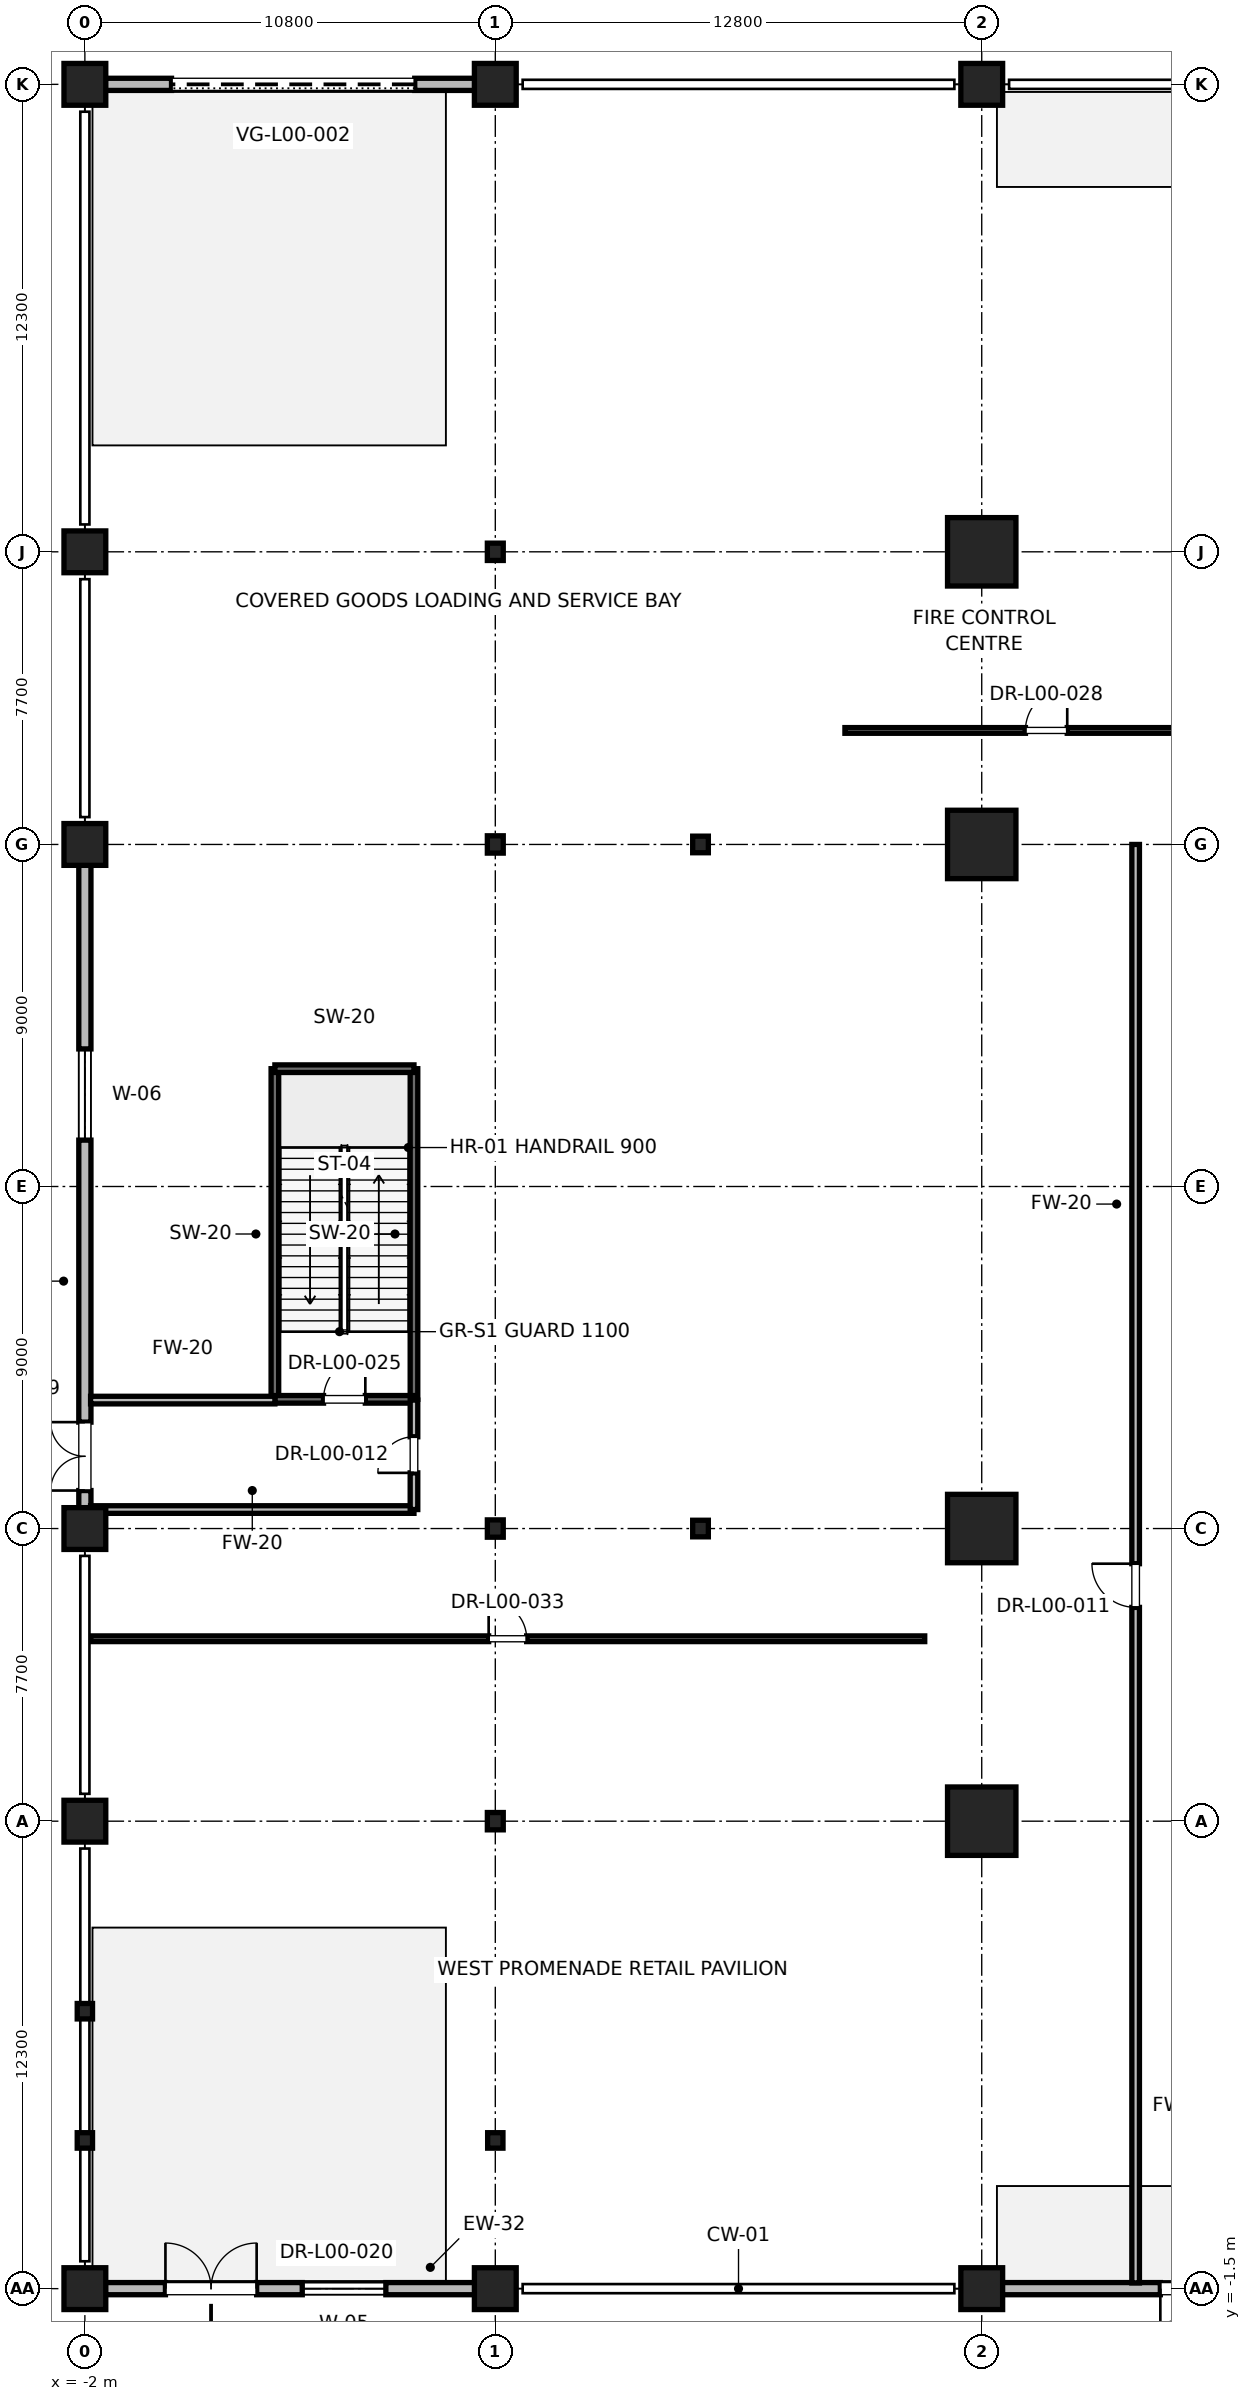
"""IFC4 building model, lengths in metres.
Left out: names, types, materials, properties, quantities, classifications, styles, units other than length and angle.
Written with IfcOpenShell. Run it as: python <this file> out.ifc"""

import sys

from ifc_helpers import new_model, si_unit, direction, frame, frame_2d, origin, origin_2d, place, context, subcontext, project, spatial, rectangle, i_section, extrude, element, fill, save


model = new_model("IFC4")
c1 = context("Model", 3, precision=1e-05, world=origin(), true_north=direction((0.0, 1.0)))
c2 = subcontext(c1, "Body", "Model", "MODEL_VIEW")
j1 = project(units=[si_unit("LENGTHUNIT", "METRE"), si_unit("PLANEANGLEUNIT", "RADIAN")], contexts=[c1])
p1 = place(None, origin())
s1 = spatial("IfcSite", under=j1, at=p1, CompositionType="ELEMENT")
p2 = place(p1, origin())
s2 = spatial("IfcBuilding", under=s1, at=p2, CompositionType="ELEMENT")
p3 = place(p2, origin())
s3 = spatial("IfcBuildingStorey", under=s2, at=p3, CompositionType="ELEMENT", Elevation=0.0)
for number, where, z_axis, x_axis in (
    (1, (21.6, 18.5, 0.0), (0.0, 0.0, 1.0), (1.0, 0.0, 0.0)),
    (2, (21.6, 36.5, 0.0), (0.0, 0.0, 1.0), (1.0, 0.0, 0.0)),
    (3, (21.6, 10.8, 0.0), (0.0, 0.0, 1.0), (1.0, 0.0, 0.0)),
    (4, (21.6, 44.2, 0.0), (0.0, 0.0, 1.0), (1.0, 0.0, 0.0)),
):
    element("IfcColumn", number, at=place(p3, frame(where, z_axis=z_axis, x_axis=x_axis)), inside=s3, PredefinedType="COLUMN", context=c2, shape_type="SweptSolid", body=[
        extrude(rectangle(XDim=1.8, YDim=1.8, at=origin_2d()), origin(), (0.0, 0.0, 1.0), 6.0),
    ])
for number, where, z_axis, x_axis in (
    (5, (14.2, 18.5, 0.0), (0.0, 0.0, 1.0), (1.0, 0.0, 0.0)),
    (6, (14.2, 36.5, 0.0), (0.0, 0.0, 1.0), (1.0, 0.0, 0.0)),
):
    element("IfcColumn", number, at=place(p3, frame(where, z_axis=z_axis, x_axis=x_axis)), inside=s3, PredefinedType="COLUMN", context=c2, shape_type="SweptSolid", body=[
        extrude(i_section(OverallWidth=0.412, OverallDepth=0.437, WebThickness=0.036, FlangeThickness=0.058, FilletRadius=0.015, at=origin_2d()), origin(), (0.0, 0.0, 1.0), 6.0),
    ])
for number, where, z_axis, x_axis in (
    (7, (-2.0, -1.5, 0.0), (0.0, 0.0, 1.0), (1.0, 0.0, 0.0)),
    (8, (-2.0, 10.8, 0.0), (0.0, 0.0, 1.0), (1.0, 0.0, 0.0)),
    (9, (-2.0, 18.5, 0.0), (0.0, 0.0, 1.0), (1.0, 0.0, 0.0)),
    (10, (-2.0, 36.5, 0.0), (0.0, 0.0, 1.0), (1.0, 0.0, 0.0)),
    (11, (-2.0, 44.2, 0.0), (0.0, 0.0, 1.0), (1.0, 0.0, 0.0)),
    (12, (-2.0, 56.5, 0.0), (0.0, 0.0, 1.0), (1.0, 0.0, 0.0)),
    (13, (8.8, -1.5, 0.0), (0.0, 0.0, 1.0), (1.0, 0.0, 0.0)),
    (14, (21.6, -1.5, 0.0), (0.0, 0.0, 1.0), (1.0, 0.0, 0.0)),
    (15, (8.8, 56.5, 0.0), (0.0, 0.0, 1.0), (1.0, 0.0, 0.0)),
    (16, (21.6, 56.5, 0.0), (0.0, 0.0, 1.0), (1.0, 0.0, 0.0)),
):
    element("IfcColumn", number, at=place(p3, frame(where, z_axis=z_axis, x_axis=x_axis)), inside=s3, PredefinedType="COLUMN", context=c2, shape_type="SweptSolid", body=[
        extrude(rectangle(XDim=1.1, YDim=1.1, at=origin_2d()), origin(), (0.0, 0.0, 1.0), 6.0),
    ])
for number, where, z_axis, x_axis in (
    (17, (8.8, 10.8, 0.0), (0.0, 0.0, 1.0), (1.0, 0.0, 0.0)),
    (18, (8.8, 18.5, 0.0), (0.0, 0.0, 1.0), (1.0, 0.0, 0.0)),
    (19, (8.8, 36.5, 0.0), (0.0, 0.0, 1.0), (1.0, 0.0, 0.0)),
    (20, (8.8, 44.2, 0.0), (0.0, 0.0, 1.0), (1.0, 0.0, 0.0)),
):
    element("IfcColumn", number, at=place(p3, frame(where, z_axis=z_axis, x_axis=x_axis)), inside=s3, PredefinedType="COLUMN", context=c2, shape_type="SweptSolid", body=[
        extrude(i_section(OverallWidth=0.418, OverallDepth=0.456, WebThickness=0.042, FlangeThickness=0.067, FilletRadius=0.015, at=origin_2d()), origin(), (0.0, 0.0, 1.0), 6.0),
    ])
for number, where, z_axis, x_axis in (
    (21, (-2.0, 2.4, 0.0), (0.0, 0.0, 1.0), (1.0, 0.0, 0.0)),
    (22, (8.8, 2.4, 0.0), (0.0, 0.0, 1.0), (1.0, 0.0, 0.0)),
    (23, (-2.0, 5.8, 0.0), (0.0, 0.0, 1.0), (1.0, 0.0, 0.0)),
):
    element("IfcColumn", number, at=place(p3, frame(where, z_axis=z_axis, x_axis=x_axis)), inside=s3, PredefinedType="COLUMN", context=c2, shape_type="SweptSolid", body=[
        extrude(i_section(OverallWidth=0.403, OverallDepth=0.406, WebThickness=0.027, FlangeThickness=0.043, FilletRadius=0.015, at=origin_2d()), origin(), (0.0, 0.0, 1.0), 6.0),
    ])
p4 = place(p3, frame((-1.46, -1.5, 0.0), z_axis=(0.0, 0.0, 1.0), x_axis=(1.0, 0.0, 0.0)))
e24 = element("IfcWall", 24, at=p4, inside=s3, PredefinedType="SOLIDWALL", context=c2, shape_type="SweptSolid", body=[
    extrude(rectangle(XDim=9.72, YDim=0.32, at=frame_2d((4.86, 0.0))), origin(), (0.0, 0.0, 1.0), 4.759),
])
p5 = place(p4, frame((1.58, 0.0, 0.0)))
e25 = element("IfcOpeningElement", 25, at=p5, cuts=e24, PredefinedType="OPENING", context=c2, shape_type="SweptSolid", body=[
    extrude(rectangle(XDim=2.4, YDim=2.8, at=frame_2d((1.2, 1.4))), frame((0.0, 0.16, 0.0), z_axis=(0.0, -1.0, 0.0), x_axis=(1.0, 0.0, 0.0)), (0.0, 0.0, 1.0), 0.32),
])
p6 = place(p4, frame((5.18, 0.0, 0.85)))
e26 = element("IfcOpeningElement", 26, at=p6, cuts=e24, PredefinedType="OPENING", context=c2, shape_type="SweptSolid", body=[
    extrude(rectangle(XDim=2.2, YDim=2.35, at=frame_2d((1.1, 1.175))), frame((0.0, 0.16, 0.0), z_axis=(0.0, -1.0, 0.0), x_axis=(1.0, 0.0, 0.0)), (0.0, 0.0, 1.0), 0.32),
])
p7 = place(p3, frame((28.46, -1.5, 0.0), z_axis=(0.0, 0.0, 1.0), x_axis=(-1.0, 0.0, 0.0)))
e27 = element("IfcWall", 27, at=p7, inside=s3, PredefinedType="SOLIDWALL", context=c2, shape_type="SweptSolid", body=[
    extrude(rectangle(XDim=6.32, YDim=0.32, at=frame_2d((3.16, 0.0))), origin(), (0.0, 0.0, 1.0), 4.33),
])
p8 = place(p7, frame((0.36, 0.0, 0.0)))
e28 = element("IfcOpeningElement", 28, at=p8, cuts=e27, PredefinedType="OPENING", context=c2, shape_type="SweptSolid", body=[
    extrude(rectangle(XDim=1.8, YDim=2.4, at=frame_2d((0.9, 1.2))), frame((0.0, 0.16, 0.0), z_axis=(0.0, -1.0, 0.0), x_axis=(1.0, 0.0, 0.0)), (0.0, 0.0, 1.0), 0.32),
])
p9 = place(p3, frame((8.26, 56.5, 0.0), z_axis=(0.0, 0.0, 1.0), x_axis=(-1.0, 0.0, 0.0)))
e29 = element("IfcWall", 29, at=p9, inside=s3, PredefinedType="SOLIDWALL", context=c2, shape_type="SweptSolid", body=[
    extrude(rectangle(XDim=9.72, YDim=0.32, at=frame_2d((4.86, 0.0))), origin(), (0.0, 0.0, 1.0), 4.759),
])
p10 = place(p9, frame((1.58, 0.0, 0.0)))
e30 = element("IfcOpeningElement", 30, at=p10, cuts=e29, PredefinedType="OPENING", context=c2, shape_type="SweptSolid", body=[
    extrude(rectangle(XDim=6.4, YDim=4.1, at=frame_2d((3.2, 2.05))), frame((0.0, 0.16, 0.0), z_axis=(0.0, -1.0, 0.0), x_axis=(1.0, 0.0, 0.0)), (0.0, 0.0, 1.0), 0.32),
])
p11 = place(p3, frame((-2.0, 19.04, 0.0), z_axis=(0.0, 0.0, 1.0), x_axis=(0.0, 1.0, 0.0)))
e31 = element("IfcWall", 31, at=p11, inside=s3, PredefinedType="SOLIDWALL", context=c2, shape_type="SweptSolid", body=[
    extrude(rectangle(XDim=16.92, YDim=0.32, at=frame_2d((8.46, 0.0))), origin(), (0.0, 0.0, 1.0), 4.759),
])
p12 = place(p11, frame((0.46, 0.0, 0.0)))
e32 = element("IfcOpeningElement", 32, at=p12, cuts=e31, PredefinedType="OPENING", context=c2, shape_type="SweptSolid", body=[
    extrude(rectangle(XDim=1.8, YDim=2.4, at=frame_2d((0.9, 1.2))), frame((0.0, 0.16, 0.0), z_axis=(0.0, -1.0, 0.0), x_axis=(1.0, 0.0, 0.0)), (0.0, 0.0, 1.0), 0.32),
])
p13 = place(p11, frame((9.68, 0.0, 0.9)))
e33 = element("IfcOpeningElement", 33, at=p13, cuts=e31, PredefinedType="OPENING", context=c2, shape_type="SweptSolid", body=[
    extrude(rectangle(XDim=2.4, YDim=2.4, at=frame_2d((1.2, 1.2))), frame((0.0, 0.16, 0.0), z_axis=(0.0, -1.0, 0.0), x_axis=(1.0, 0.0, 0.0)), (0.0, 0.0, 1.0), 0.32),
])
for number, where, z_axis, x_axis in (
    (34, (3.0, 21.9, 0.0), (0.0, 0.0, 1.0), (0.0, 1.0, 0.0)),
    (35, (6.66, 21.9, 0.0), (0.0, 0.0, 1.0), (0.0, 1.0, 0.0)),
):
    element("IfcWall", number, at=place(p3, frame(where, z_axis=z_axis, x_axis=x_axis)), inside=s3, PredefinedType="SOLIDWALL", context=c2, shape_type="SweptSolid", body=[
        extrude(rectangle(XDim=8.7, YDim=0.2, at=frame_2d((4.35, 0.0))), origin(), (0.0, 0.0, 1.0), 5.72),
    ])
p14 = place(p3, frame((3.0, 30.6, 0.0), z_axis=(0.0, 0.0, 1.0), x_axis=(1.0, 0.0, 0.0)))
e36 = element("IfcWall", 36, at=p14, inside=s3, PredefinedType="SOLIDWALL", context=c2, shape_type="SweptSolid", body=[
    extrude(rectangle(XDim=3.66, YDim=0.2, at=frame_2d((1.83, 0.0))), origin(), (0.0, 0.0, 1.0), 5.72),
])
p15 = place(p3, frame((3.0, 21.9, 0.0), z_axis=(0.0, 0.0, 1.0), x_axis=(1.0, 0.0, 0.0)))
e37 = element("IfcWall", 37, at=p15, inside=s3, PredefinedType="SOLIDWALL", context=c2, shape_type="SweptSolid", body=[
    extrude(rectangle(XDim=3.66, YDim=0.2, at=frame_2d((1.83, 0.0))), origin(), (0.0, 0.0, 1.0), 5.72),
])
p16 = place(p15, frame((1.28, 0.0, 0.0)))
e38 = element("IfcOpeningElement", 38, at=p16, cuts=e37, PredefinedType="OPENING", context=c2, shape_type="SweptSolid", body=[
    extrude(rectangle(XDim=1.1, YDim=2.15, at=frame_2d((0.55, 1.075))), frame((0.0, 0.1, 0.0), z_axis=(0.0, -1.0, 0.0), x_axis=(1.0, 0.0, 0.0)), (0.0, 0.0, 1.0), 0.2),
])
p17 = place(p3, frame((-1.85, 19.0, 0.0), z_axis=(0.0, 0.0, 1.0), x_axis=(1.0, 0.0, 0.0)))
e39 = element("IfcWall", 39, at=p17, inside=s3, PredefinedType="PARTITIONING", context=c2, shape_type="SweptSolid", body=[
    extrude(rectangle(XDim=8.51, YDim=0.2, at=frame_2d((4.255, 0.0))), origin(), (0.0, 0.0, 1.0), 2.85),
])
p18 = place(p3, frame((-1.85, 21.88, 0.0), z_axis=(0.0, 0.0, 1.0), x_axis=(1.0, 0.0, 0.0)))
e40 = element("IfcWall", 40, at=p18, inside=s3, PredefinedType="PARTITIONING", context=c2, shape_type="SweptSolid", body=[
    extrude(rectangle(XDim=4.85, YDim=0.2, at=frame_2d((2.425, 0.0))), origin(), (0.0, 0.0, 1.0), 2.85),
])
p19 = place(p3, frame((6.66, 19.0, 0.0), z_axis=(0.0, 0.0, 1.0), x_axis=(0.0, 1.0, 0.0)))
e41 = element("IfcWall", 41, at=p19, inside=s3, PredefinedType="PARTITIONING", context=c2, shape_type="SweptSolid", body=[
    extrude(rectangle(XDim=2.88, YDim=0.2, at=frame_2d((1.44, 0.0))), origin(), (0.0, 0.0, 1.0), 2.85),
])
p20 = place(p19, frame((0.965, 0.0, 0.0)))
e42 = element("IfcOpeningElement", 42, at=p20, cuts=e41, PredefinedType="OPENING", context=c2, shape_type="SweptSolid", body=[
    extrude(rectangle(XDim=0.95, YDim=2.15, at=frame_2d((0.475, 1.075))), frame((0.0, 0.1, 0.0), z_axis=(0.0, -1.0, 0.0), x_axis=(1.0, 0.0, 0.0)), (0.0, 0.0, 1.0), 0.2),
])
p21 = place(p3, frame((25.65, -1.35, 0.0), z_axis=(0.0, 0.0, 1.0), x_axis=(0.0, 1.0, 0.0)))
e43 = element("IfcWall", 43, at=p21, inside=s3, PredefinedType="PARTITIONING", context=c2, shape_type="SweptSolid", body=[
    extrude(rectangle(XDim=37.85, YDim=0.2, at=frame_2d((18.925, 0.0))), origin(), (0.0, 0.0, 1.0), 2.85),
])
p22 = place(p21, frame((17.775, 0.0, 0.0)))
e44 = element("IfcOpeningElement", 44, at=p22, cuts=e43, PredefinedType="OPENING", context=c2, shape_type="SweptSolid", body=[
    extrude(rectangle(XDim=1.15, YDim=2.2, at=frame_2d((0.575, 1.1))), frame((0.0, 0.1, 0.0), z_axis=(0.0, -1.0, 0.0), x_axis=(1.0, 0.0, 0.0)), (0.0, 0.0, 1.0), 0.2),
])
p23 = place(p3, frame((18.0, 39.5, 0.0), z_axis=(0.0, 0.0, 1.0), x_axis=(1.0, 0.0, 0.0)))
e45 = element("IfcWall", 45, at=p23, inside=s3, PredefinedType="PARTITIONING", context=c2, shape_type="SweptSolid", body=[
    extrude(rectangle(XDim=10.6, YDim=0.15, at=frame_2d((5.3, 0.0))), origin(), (0.0, 0.0, 1.0), 2.85),
])
p24 = place(p23, frame((4.75, 0.0, 0.0)))
e46 = element("IfcOpeningElement", 46, at=p24, cuts=e45, PredefinedType="OPENING", context=c2, shape_type="SweptSolid", body=[
    extrude(rectangle(XDim=1.1, YDim=2.15, at=frame_2d((0.55, 1.075))), frame((0.0, 0.075, 0.0), z_axis=(0.0, -1.0, 0.0), x_axis=(1.0, 0.0, 0.0)), (0.0, 0.0, 1.0), 0.15),
])
p25 = place(p3, frame((-1.85, 15.6, 0.0), z_axis=(0.0, 0.0, 1.0), x_axis=(1.0, 0.0, 0.0)))
e47 = element("IfcWall", 47, at=p25, inside=s3, PredefinedType="PARTITIONING", context=c2, shape_type="SweptSolid", body=[
    extrude(rectangle(XDim=21.95, YDim=0.15, at=frame_2d((10.975, 0.0))), origin(), (0.0, 0.0, 1.0), 2.85),
])
p26 = place(p25, frame((10.475, 0.0, 0.0)))
e48 = element("IfcOpeningElement", 48, at=p26, cuts=e47, PredefinedType="OPENING", context=c2, shape_type="SweptSolid", body=[
    extrude(rectangle(XDim=1.0, YDim=2.15, at=frame_2d((0.5, 1.075))), frame((0.0, 0.075, 0.0), z_axis=(0.0, -1.0, 0.0), x_axis=(1.0, 0.0, 0.0)), (0.0, 0.0, 1.0), 0.15),
])
p27 = place(p5, origin())
e49 = element("IfcDoor", 49, at=p27, inside=s3, OperationType="DOUBLE_DOOR_SINGLE_SWING", PredefinedType="DOOR", context=c2, shape_type="SweptSolid", body=[
    extrude(rectangle(XDim=2.4, YDim=2.8, at=frame_2d((1.2, 1.4))), frame((0.0, 0.025, 0.0), z_axis=(0.0, -1.0, 0.0), x_axis=(1.0, 0.0, 0.0)), (0.0, 0.0, 1.0), 0.05),
])
fill(e25, e49)
p28 = place(p6, origin())
e50 = element("IfcWindow", 50, at=p28, inside=s3, PartitioningType="SINGLE_PANEL", PredefinedType="WINDOW", context=c2, shape_type="SweptSolid", body=[
    extrude(rectangle(XDim=2.2, YDim=2.35, at=frame_2d((1.1, 1.175))), frame((0.0, 0.03, 0.0), z_axis=(0.0, -1.0, 0.0), x_axis=(1.0, 0.0, 0.0)), (0.0, 0.0, 1.0), 0.06),
])
fill(e26, e50)
p29 = place(p8, origin())
e51 = element("IfcDoor", 51, at=p29, inside=s3, OperationType="DOUBLE_DOOR_SINGLE_SWING", PredefinedType="DOOR", context=c2, shape_type="SweptSolid", body=[
    extrude(rectangle(XDim=1.8, YDim=2.4, at=frame_2d((0.9, 1.2))), frame((0.0, 0.025, 0.0), z_axis=(0.0, -1.0, 0.0), x_axis=(1.0, 0.0, 0.0)), (0.0, 0.0, 1.0), 0.05),
])
fill(e28, e51)
p30 = place(p10, origin())
e52 = element("IfcDoor", 52, at=p30, inside=s3, OperationType="ROLLINGUP", PredefinedType="GATE", context=c2, shape_type="SweptSolid", body=[
    extrude(rectangle(XDim=6.4, YDim=4.1, at=frame_2d((3.2, 2.05))), frame((0.0, 0.025, 0.0), z_axis=(0.0, -1.0, 0.0), x_axis=(1.0, 0.0, 0.0)), (0.0, 0.0, 1.0), 0.05),
])
fill(e30, e52)
p31 = place(p12, origin())
e53 = element("IfcDoor", 53, at=p31, inside=s3, OperationType="DOUBLE_DOOR_SINGLE_SWING", PredefinedType="DOOR", context=c2, shape_type="SweptSolid", body=[
    extrude(rectangle(XDim=1.8, YDim=2.4, at=frame_2d((0.9, 1.2))), frame((0.0, 0.025, 0.0), z_axis=(0.0, -1.0, 0.0), x_axis=(1.0, 0.0, 0.0)), (0.0, 0.0, 1.0), 0.05),
])
fill(e32, e53)
p32 = place(p13, origin())
e54 = element("IfcWindow", 54, at=p32, inside=s3, PartitioningType="SINGLE_PANEL", PredefinedType="WINDOW", context=c2, shape_type="SweptSolid", body=[
    extrude(rectangle(XDim=2.4, YDim=2.4, at=frame_2d((1.2, 1.2))), frame((0.0, 0.03, 0.0), z_axis=(0.0, -1.0, 0.0), x_axis=(1.0, 0.0, 0.0)), (0.0, 0.0, 1.0), 0.06),
])
fill(e33, e54)
p33 = place(p16, origin())
e55 = element("IfcDoor", 55, at=p33, inside=s3, OperationType="SINGLE_SWING_RIGHT", PredefinedType="DOOR", context=c2, shape_type="SweptSolid", body=[
    extrude(rectangle(XDim=1.1, YDim=2.15, at=frame_2d((0.55, 1.075))), frame((0.0, 0.025, 0.0), z_axis=(0.0, -1.0, 0.0), x_axis=(1.0, 0.0, 0.0)), (0.0, 0.0, 1.0), 0.05),
])
fill(e38, e55)
p34 = place(p20, origin())
e56 = element("IfcDoor", 56, at=p34, inside=s3, OperationType="SINGLE_SWING_LEFT", PredefinedType="DOOR", context=c2, shape_type="SweptSolid", body=[
    extrude(rectangle(XDim=0.95, YDim=2.15, at=frame_2d((0.475, 1.075))), frame((0.0, 0.025, 0.0), z_axis=(0.0, -1.0, 0.0), x_axis=(1.0, 0.0, 0.0)), (0.0, 0.0, 1.0), 0.05),
])
fill(e42, e56)
p35 = place(p22, origin())
e57 = element("IfcDoor", 57, at=p35, inside=s3, OperationType="SINGLE_SWING_RIGHT", PredefinedType="DOOR", context=c2, shape_type="SweptSolid", body=[
    extrude(rectangle(XDim=1.15, YDim=2.2, at=frame_2d((0.575, 1.1))), frame((0.0, 0.025, 0.0), z_axis=(0.0, -1.0, 0.0), x_axis=(1.0, 0.0, 0.0)), (0.0, 0.0, 1.0), 0.05),
])
fill(e44, e57)
p36 = place(p24, origin())
e58 = element("IfcDoor", 58, at=p36, inside=s3, OperationType="SINGLE_SWING_RIGHT", PredefinedType="DOOR", context=c2, shape_type="SweptSolid", body=[
    extrude(rectangle(XDim=1.1, YDim=2.15, at=frame_2d((0.55, 1.075))), frame((0.0, 0.025, 0.0), z_axis=(0.0, -1.0, 0.0), x_axis=(1.0, 0.0, 0.0)), (0.0, 0.0, 1.0), 0.05),
])
fill(e46, e58)
p37 = place(p26, origin())
e59 = element("IfcDoor", 59, at=p37, inside=s3, OperationType="SINGLE_SWING_LEFT", PredefinedType="DOOR", context=c2, shape_type="SweptSolid", body=[
    extrude(rectangle(XDim=1.0, YDim=2.15, at=frame_2d((0.5, 1.075))), frame((0.0, 0.025, 0.0), z_axis=(0.0, -1.0, 0.0), x_axis=(1.0, 0.0, 0.0)), (0.0, 0.0, 1.0), 0.05),
])
fill(e48, e59)
save(model, sys.argv[1])
